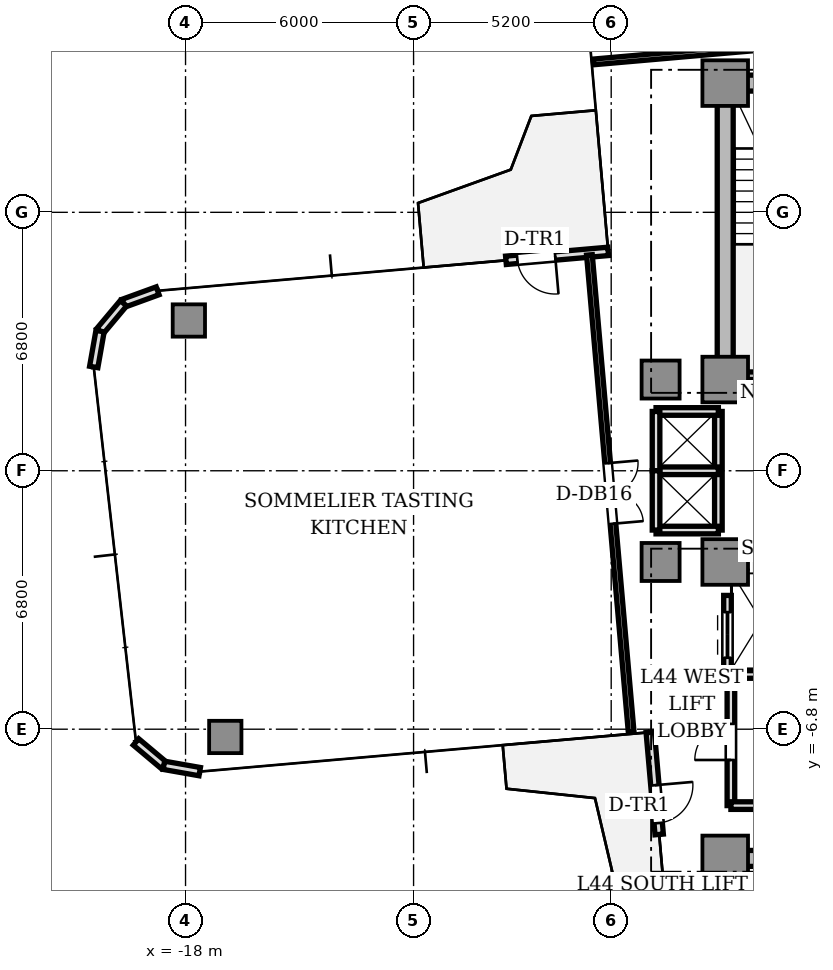
"""IFC4 building model, lengths in metres.
Left out: names, types, materials, properties, quantities, classifications, styles, units other than length and angle.
Written with IfcOpenShell. Run it as: python <this file> out.ifc"""

import sys

from ifc_helpers import new_model, si_unit, direction, frame, frame_2d, origin, origin_2d, place, context, subcontext, project, spatial, rectangle, extrude, source, transform, mapped, element, fill, save


model = new_model("IFC4")
c1 = context("Model", 3, precision=1e-05, world=origin(), true_north=direction((0.0, 1.0)))
c2 = subcontext(c1, "Body", "Model", "MODEL_VIEW")
j1 = project(units=[si_unit("LENGTHUNIT", "METRE"), si_unit("PLANEANGLEUNIT", "RADIAN")], contexts=[c1])
p1 = place(None, origin())
s1 = spatial("IfcSite", under=j1, at=p1, CompositionType="ELEMENT")
p2 = place(p1, origin())
s2 = spatial("IfcBuilding", under=s1, at=p2, CompositionType="ELEMENT")
p3 = place(p2, frame((0.0, 0.0, 160.65)))
s3 = spatial("IfcBuildingStorey", under=s2, at=p3, CompositionType="ELEMENT", Elevation=160.65)
p4 = place(p3, frame((-3.55, 10.2, 0.0), z_axis=(0.0, 0.0, 1.0), x_axis=(1.0, 0.0, 0.0)))
e1 = element("IfcWall", 1, at=p4, inside=s3, PredefinedType="SHEAR", context=c2, shape_type="SweptSolid", body=[
    extrude(rectangle(XDim=7.1, YDim=0.42, at=frame_2d((3.55, 0.0))), origin(), (0.0, 0.0, 1.0), 3.11),
])
p5 = place(p3, frame((-3.8, 2.85, 0.0), z_axis=(0.0, 0.0, 1.0), x_axis=(0.0, 1.0, 0.0)))
e2 = element("IfcWall", 2, at=p5, inside=s3, PredefinedType="SHEAR", context=c2, shape_type="SweptSolid", body=[
    extrude(rectangle(XDim=6.9, YDim=0.42, at=frame_2d((3.45, 0.0))), origin(), (0.0, 0.0, 1.0), 3.11),
])
p6 = place(p3, frame((-3.55, -10.2, 0.0), z_axis=(0.0, 0.0, 1.0), x_axis=(1.0, 0.0, 0.0)))
e3 = element("IfcWall", 3, at=p6, inside=s3, PredefinedType="SHEAR", context=c2, shape_type="SweptSolid", body=[
    extrude(rectangle(XDim=7.1, YDim=0.42, at=frame_2d((3.55, 0.0))), origin(), (0.0, 0.0, 1.0), 3.11),
])
m1 = source(origin(), c2, "Body", "SweptSolid", [
    extrude(rectangle(XDim=1.2, YDim=1.2, at=origin_2d()), origin(), (0.0, 0.0, 1.0), 3.11),
])
for number, where, z_axis, x_axis in (
    (4, (-3.8, 2.4, 0.0), (0.0, 0.0, 1.0), (1.0, 0.0, 0.0)),
    (5, (-3.8, 10.2, 0.0), (0.0, 0.0, 1.0), (1.0, 0.0, 0.0)),
    (6, (-3.8, -2.4, 0.0), (0.0, 0.0, 1.0), (1.0, 0.0, 0.0)),
    (7, (-3.8, -10.2, 0.0), (0.0, 0.0, 1.0), (1.0, 0.0, 0.0)),
):
    element("IfcColumn", number, at=place(p3, frame(where, z_axis=z_axis, x_axis=x_axis)), inside=s3, PredefinedType="COLUMN", context=c2, shape_type="MappedRepresentation", body=[
        mapped(m1, transform((0.0, 0.0, 0.0), scale=1.0)),
    ])
m2 = source(origin(), c2, "Body", "SweptSolid", [
    extrude(rectangle(XDim=1.0, YDim=1.0, at=origin_2d()), origin(), (0.0, 0.0, 1.0), 3.11),
])
for number, where, z_axis, x_axis in (
    (8, (-5.5, 2.4, 0.0), (0.0, 0.0, 1.0), (1.0, 0.0, 0.0)),
    (9, (-5.5, -2.4, 0.0), (0.0, 0.0, 1.0), (1.0, 0.0, 0.0)),
):
    element("IfcColumn", number, at=place(p3, frame(where, z_axis=z_axis, x_axis=x_axis)), inside=s3, PredefinedType="COLUMN", context=c2, shape_type="MappedRepresentation", body=[
        mapped(m2, transform((0.0, 0.0, 0.0), scale=1.0)),
    ])
m3 = source(origin(), c2, "Body", "SweptSolid", [
    extrude(rectangle(XDim=0.85, YDim=0.85, at=origin_2d()), origin(), (0.0, 0.0, 1.0), 3.11),
])
for number, where, z_axis, x_axis in (
    (10, (-17.913, 3.954, 0.0), (0.0, 0.0, 1.0), (1.0, 0.0, 0.0)),
    (11, (-16.954, -7.004, 0.0), (0.0, 0.0, 1.0), (1.0, 0.0, 0.0)),
):
    element("IfcColumn", number, at=place(p3, frame(where, z_axis=z_axis, x_axis=x_axis)), inside=s3, PredefinedType="COLUMN", context=c2, shape_type="MappedRepresentation", body=[
        mapped(m3, transform((0.0, 0.0, 0.0), scale=1.0)),
    ])
p7 = place(p3, frame((-6.879, 5.772, 0.0), z_axis=(0.0, 0.0, 1.0), x_axis=(-0.996193619346, -0.087168071984, 0.0)))
e12 = element("IfcWall", 12, at=p7, inside=s3, PredefinedType="STANDARD", context=c2, shape_type="SweptSolid", body=[
    extrude(rectangle(XDim=2.7, YDim=0.22, at=frame_2d((1.35, 0.0))), origin(), (0.0, 0.0, 1.0), 3.11),
])
p8 = place(p7, frame((1.4, 0.0, 0.0)))
e13 = element("IfcOpeningElement", 13, at=p8, cuts=e12, PredefinedType="OPENING", context=c2, shape_type="SweptSolid", body=[
    extrude(rectangle(XDim=1.0, YDim=2.2, at=frame_2d((0.5, 1.1))), frame((0.0, 0.12, 0.0), z_axis=(0.0, -1.0, 0.0), x_axis=(1.0, 0.0, 0.0)), (0.0, 0.0, 1.0), 0.24),
])
p9 = place(p3, frame((-18.734, 4.735, 0.0), z_axis=(0.0, 0.0, 1.0), x_axis=(-0.939741306239, -0.34188635151, 0.0)))
e14 = element("IfcWall", 14, at=p9, inside=s3, PredefinedType="STANDARD", context=c2, shape_type="SweptSolid", body=[
    extrude(rectangle(XDim=0.958, YDim=0.22, at=frame_2d((0.479, 0.0))), origin(), (0.0, 0.0, 1.0), 3.11),
])
for number, where, z_axis, x_axis in (
    (15, (-19.634, 4.408, 0.0), (0.0, 0.0, 1.0), (-0.643, -0.766, 0.0)),
    (16, (-20.25, 3.674, 0.0), (0.0, 0.0, 1.0), (-0.174, -0.985, 0.0)),
):
    element("IfcWall", number, at=place(p3, frame(where, z_axis=z_axis, x_axis=x_axis)), inside=s3, PredefinedType="STANDARD", context=c2, shape_type="SweptSolid", body=[
        extrude(rectangle(XDim=0.958, YDim=0.22, at=frame_2d((0.479, 0.0))), origin(), (0.0, 0.0, 1.0), 3.11),
    ])
p10 = place(p3, frame((-19.304, -7.135, 0.0), z_axis=(0.0, 0.0, 1.0), x_axis=(0.766001159887, -0.642839189107, 0.0)))
e17 = element("IfcWall", 17, at=p10, inside=s3, PredefinedType="STANDARD", context=c2, shape_type="SweptSolid", body=[
    extrude(rectangle(XDim=0.958, YDim=0.22, at=frame_2d((0.479, 0.0))), origin(), (0.0, 0.0, 1.0), 3.11),
])
p11 = place(p3, frame((-18.57, -7.75, 0.0), z_axis=(0.0, 0.0, 1.0), x_axis=(0.984770724397, -0.173858046606, 0.0)))
e18 = element("IfcWall", 18, at=p11, inside=s3, PredefinedType="STANDARD", context=c2, shape_type="SweptSolid", body=[
    extrude(rectangle(XDim=0.958, YDim=0.22, at=frame_2d((0.479, 0.0))), origin(), (0.0, 0.0, 1.0), 3.11),
])
p12 = place(p3, frame((-5.772, -6.879, 0.0), z_axis=(0.0, 0.0, 1.0), x_axis=(0.087168071984, -0.996193619346, 0.0)))
e19 = element("IfcWall", 19, at=p12, inside=s3, PredefinedType="STANDARD", context=c2, shape_type="SweptSolid", body=[
    extrude(rectangle(XDim=2.7, YDim=0.22, at=frame_2d((1.35, 0.0))), origin(), (0.0, 0.0, 1.0), 3.11),
])
p13 = place(p12, frame((1.4, 0.0, 0.0)))
e20 = element("IfcOpeningElement", 20, at=p13, cuts=e19, PredefinedType="OPENING", context=c2, shape_type="SweptSolid", body=[
    extrude(rectangle(XDim=1.0, YDim=2.2, at=frame_2d((0.5, 1.1))), frame((0.0, 0.12, 0.0), z_axis=(0.0, -1.0, 0.0), x_axis=(1.0, 0.0, 0.0)), (0.0, 0.0, 1.0), 0.24),
])
p14 = place(p3, frame((-3.72, 2.5, 0.0), z_axis=(0.0, 0.0, 1.0), x_axis=(1.0, 0.0, 0.0)))
e21 = element("IfcWall", 21, at=p14, inside=s3, PredefinedType="SOLIDWALL", context=c2, shape_type="SweptSolid", body=[
    extrude(rectangle(XDim=3.72, YDim=0.2, at=frame_2d((1.86, 0.0))), origin(), (0.0, 0.0, 1.0), 3.11),
])
p15 = place(p3, frame((-3.74, -5.36, 0.0), z_axis=(0.0, 0.0, 1.0), x_axis=(1.0, 0.0, 0.0)))
e22 = element("IfcWall", 22, at=p15, inside=s3, PredefinedType="SOLIDWALL", context=c2, shape_type="SweptSolid", body=[
    extrude(rectangle(XDim=1.74, YDim=0.2, at=frame_2d((0.87, 0.0))), origin(), (0.0, 0.0, 1.0), 2.66),
])
p16 = place(p3, frame((-3.74, -5.36, 0.0), z_axis=(0.0, 0.0, 1.0), x_axis=(0.0, 1.0, 0.0)))
e23 = element("IfcWall", 23, at=p16, inside=s3, PredefinedType="SOLIDWALL", context=c2, shape_type="SweptSolid", body=[
    extrude(rectangle(XDim=2.08, YDim=0.2, at=frame_2d((1.04, 0.0))), origin(), (0.0, 0.0, 1.0), 2.66),
])
p17 = place(p16, frame((0.44, 0.0, 0.0)))
e24 = element("IfcOpeningElement", 24, at=p17, cuts=e23, PredefinedType="OPENING", context=c2, shape_type="SweptSolid", body=[
    extrude(rectangle(XDim=1.2, YDim=2.2, at=frame_2d((0.6, 1.1))), frame((0.0, 0.11, 0.0), z_axis=(0.0, -1.0, 0.0), x_axis=(1.0, 0.0, 0.0)), (0.0, 0.0, 1.0), 0.22),
])
p18 = place(p3, frame((-3.98, -1.56, 0.0), z_axis=(0.0, 0.0, 1.0), x_axis=(0.0, 1.0, 0.0)))
e25 = element("IfcWall", 25, at=p18, inside=s3, PredefinedType="SOLIDWALL", context=c2, shape_type="SweptSolid", body=[
    extrude(rectangle(XDim=3.12, YDim=0.2, at=frame_2d((1.56, 0.0))), origin(), (0.0, 0.0, 1.0), 2.28),
])
for number, where, z_axis, x_axis in (
    (26, (-5.62, 1.56, 0.0), (0.0, 0.0, 1.0), (1.0, 0.0, 0.0)),
    (27, (-5.62, -1.56, 0.0), (0.0, 0.0, 1.0), (1.0, 0.0, 0.0)),
    (28, (-5.62, 0.0, 0.0), (0.0, 0.0, 1.0), (1.0, 0.0, 0.0)),
):
    element("IfcWall", number, at=place(p3, frame(where, z_axis=z_axis, x_axis=x_axis)), inside=s3, PredefinedType="SOLIDWALL", context=c2, shape_type="SweptSolid", body=[
        extrude(rectangle(XDim=1.64, YDim=0.2, at=frame_2d((0.82, 0.0))), origin(), (0.0, 0.0, 1.0), 2.66),
    ])
for number, where, z_axis, x_axis in (
    (29, (-5.62, 0.0, 0.0), (0.0, 0.0, 1.0), (0.0, 1.0, 0.0)),
    (30, (-5.62, -1.56, 0.0), (0.0, 0.0, 1.0), (0.0, 1.0, 0.0)),
):
    element("IfcWall", number, at=place(p3, frame(where, z_axis=z_axis, x_axis=x_axis)), inside=s3, PredefinedType="SOLIDWALL", context=c2, shape_type="SweptSolid", body=[
        extrude(rectangle(XDim=1.56, YDim=0.2, at=frame_2d((0.78, 0.0))), origin(), (0.0, 0.0, 1.0), 2.66),
    ])
p19 = place(p3, frame((-3.65, -8.81, 0.0), z_axis=(0.0, 0.0, 1.0), x_axis=(0.0, 1.0, 0.0)))
e31 = element("IfcWall", 31, at=p19, inside=s3, PredefinedType="SOLIDWALL", context=c2, shape_type="SweptSolid", body=[
    extrude(rectangle(XDim=3.43, YDim=0.2, at=frame_2d((1.715, 0.0))), origin(), (0.0, 0.0, 1.0), 2.66),
])
p20 = place(p19, frame((1.2, 0.0, 0.0)))
e32 = element("IfcOpeningElement", 32, at=p20, cuts=e31, PredefinedType="OPENING", context=c2, shape_type="SweptSolid", body=[
    extrude(rectangle(XDim=0.95, YDim=2.15, at=frame_2d((0.475, 1.075))), frame((0.0, 0.11, 0.0), z_axis=(0.0, -1.0, 0.0), x_axis=(1.0, 0.0, 0.0)), (0.0, 0.0, 1.0), 0.22),
])
p21 = place(p3, frame((-3.65, -8.81, 0.0), z_axis=(0.0, 0.0, 1.0), x_axis=(1.0, 0.0, 0.0)))
e33 = element("IfcWall", 33, at=p21, inside=s3, PredefinedType="SOLIDWALL", context=c2, shape_type="SweptSolid", body=[
    extrude(rectangle(XDim=1.67, YDim=0.2, at=frame_2d((0.835, 0.0))), origin(), (0.0, 0.0, 1.0), 2.66),
])
p22 = place(p3, frame((5.287, 11.856, 0.0), z_axis=(0.0, 0.0, 1.0), x_axis=(-0.996194790044, -0.087154691724, 0.0)))
e34 = element("IfcWall", 34, at=p22, inside=s3, PredefinedType="PARTITIONING", context=c2, shape_type="SweptSolid", body=[
    extrude(rectangle(XDim=12.6, YDim=0.15, at=frame_2d((6.3, 0.0))), origin(), (0.0, 0.0, 1.0), 2.66),
])
p23 = place(p22, frame((5.5, 0.0, 0.0)))
e35 = element("IfcOpeningElement", 35, at=p23, cuts=e34, PredefinedType="OPENING", context=c2, shape_type="SweptSolid", body=[
    extrude(rectangle(XDim=1.6, YDim=2.25, at=frame_2d((0.8, 1.125))), frame((0.0, 0.085, 0.0), z_axis=(0.0, -1.0, 0.0), x_axis=(1.0, 0.0, 0.0)), (0.0, 0.0, 1.0), 0.17),
])
p24 = place(p3, frame((-7.373, 5.679, 0.0), z_axis=(0.0, 0.0, 1.0), x_axis=(0.087154691724, -0.996194790044, 0.0)))
e36 = element("IfcWall", 36, at=p24, inside=s3, PredefinedType="PARTITIONING", context=c2, shape_type="SweptSolid", body=[
    extrude(rectangle(XDim=12.6, YDim=0.15, at=frame_2d((6.3, 0.0))), origin(), (0.0, 0.0, 1.0), 2.66),
])
p25 = place(p24, frame((5.5, 0.0, 0.0)))
e37 = element("IfcOpeningElement", 37, at=p25, cuts=e36, PredefinedType="OPENING", context=c2, shape_type="SweptSolid", body=[
    extrude(rectangle(XDim=1.6, YDim=2.25, at=frame_2d((0.8, 1.125))), frame((0.0, 0.085, 0.0), z_axis=(0.0, -1.0, 0.0), x_axis=(1.0, 0.0, 0.0)), (0.0, 0.0, 1.0), 0.17),
])
m4 = source(origin(), c2, "Body", "SweptSolid", [
    extrude(rectangle(XDim=1.0, YDim=0.05, at=origin_2d()), origin(), (0.0, 0.0, 1.0), 2.2),
])
p26 = place(p8, frame((0.5, 0.0, 0.0)))
e38 = element("IfcDoor", 38, at=p26, inside=s3, OperationType="SINGLE_SWING_LEFT", PredefinedType="DOOR", context=c2, shape_type="MappedRepresentation", body=[
    mapped(m4, transform((0.0, 0.0, 0.0), scale=1.0)),
])
fill(e13, e38)
p27 = place(p13, frame((0.5, 0.0, 0.0)))
e39 = element("IfcDoor", 39, at=p27, inside=s3, OperationType="SINGLE_SWING_LEFT", PredefinedType="DOOR", context=c2, shape_type="MappedRepresentation", body=[
    mapped(m4, transform((0.0, 0.0, 0.0), scale=1.0)),
])
fill(e20, e39)
m5 = source(origin(), c2, "Body", "SweptSolid", [
    extrude(rectangle(XDim=1.2, YDim=0.05, at=origin_2d()), origin(), (0.0, 0.0, 1.0), 2.2),
])
p28 = place(p17, frame((0.6, 0.0, 0.0)))
e40 = element("IfcDoor", 40, at=p28, inside=s3, OperationType="DOUBLE_DOOR_SLIDING", PredefinedType="DOOR", context=c2, shape_type="MappedRepresentation", body=[
    mapped(m5, transform((0.0, 0.0, 0.0), scale=1.0)),
])
fill(e24, e40)
m6 = source(origin(), c2, "Body", "SweptSolid", [
    extrude(rectangle(XDim=0.95, YDim=0.05, at=origin_2d()), origin(), (0.0, 0.0, 1.0), 2.15),
])
p29 = place(p20, frame((0.475, 0.0, 0.0)))
e41 = element("IfcDoor", 41, at=p29, inside=s3, OperationType="SINGLE_SWING_LEFT", PredefinedType="DOOR", context=c2, shape_type="MappedRepresentation", body=[
    mapped(m6, transform((0.0, 0.0, 0.0), scale=1.0)),
])
fill(e32, e41)
m7 = source(origin(), c2, "Body", "SweptSolid", [
    extrude(rectangle(XDim=1.6, YDim=0.05, at=origin_2d()), origin(), (0.0, 0.0, 1.0), 2.25),
])
p30 = place(p25, frame((0.8, 0.0, 0.0)))
e42 = element("IfcDoor", 42, at=p30, inside=s3, OperationType="DOUBLE_DOOR_SINGLE_SWING", PredefinedType="DOOR", context=c2, shape_type="MappedRepresentation", body=[
    mapped(m7, transform((0.0, 0.0, 0.0), scale=1.0)),
])
fill(e37, e42)
save(model, sys.argv[1])
